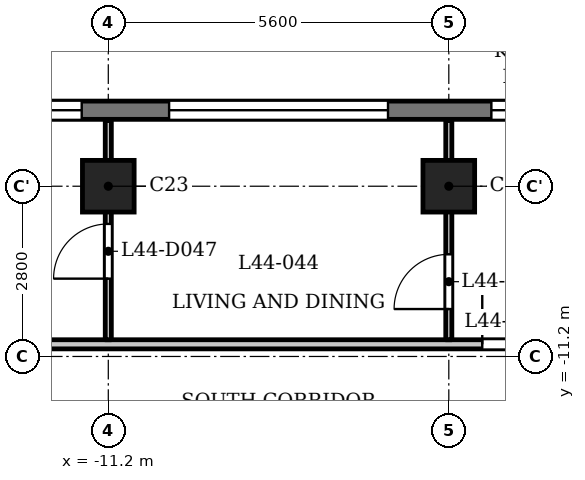
"""IFC4 building model, lengths in metres.
Left out: names, types, materials, properties, quantities, classifications, styles, units other than length and angle.
Written with IfcOpenShell. Run it as: python <this file> out.ifc"""

import sys

from ifc_helpers import new_model, si_unit, direction, frame, frame_2d, origin, origin_2d, place, context, subcontext, project, spatial, rectangle, extrude, element, fill, save


model = new_model("IFC4")
c1 = context("Model", 3, precision=1e-05, world=origin(), true_north=direction((0.0, 1.0)))
c2 = subcontext(c1, "Body", "Model", "MODEL_VIEW")
j1 = project(units=[si_unit("LENGTHUNIT", "METRE"), si_unit("PLANEANGLEUNIT", "RADIAN")], contexts=[c1])
p1 = place(None, origin())
s1 = spatial("IfcSite", under=j1, at=p1, CompositionType="ELEMENT")
p2 = place(p1, origin())
s2 = spatial("IfcBuilding", under=s1, at=p2, CompositionType="ELEMENT")
p3 = place(p2, frame((0.0, 0.0, 171.1)))
s3 = spatial("IfcBuildingStorey", under=s2, at=p3, CompositionType="ELEMENT", Elevation=171.1)
for number, where, z_axis, x_axis in (
    (1, (-11.2, -8.4, 0.0), (0.0, 0.0, 1.0), (1.0, 0.0, 0.0)),
    (2, (-5.6, -8.4, 0.0), (0.0, 0.0, 1.0), (1.0, 0.0, 0.0)),
):
    element("IfcColumn", number, at=place(p3, frame(where, z_axis=z_axis, x_axis=x_axis)), inside=s3, PredefinedType="COLUMN", context=c2, shape_type="SweptSolid", body=[
        extrude(rectangle(XDim=0.85, YDim=0.85, at=origin_2d()), origin(), (0.0, 0.0, 1.0), 3.5),
    ])
p4 = place(p3, frame((13.8, -7.15, 0.0), z_axis=(0.0, 0.0, 1.0), x_axis=(-1.0, 0.0, 0.0)))
e3 = element("IfcWall", 3, at=p4, inside=s3, PredefinedType="SOLIDWALL", context=c2, shape_type="SweptSolid", body=[
    extrude(rectangle(XDim=27.6, YDim=0.3, at=frame_2d((13.8, 0.0))), origin(), (0.0, 0.0, 1.0), 3.2),
])
p5 = place(p4, frame((0.363, 0.0, 0.9)))
e4 = element("IfcOpeningElement", 4, at=p5, cuts=e3, PredefinedType="OPENING", context=c2, shape_type="SweptSolid", body=[
    extrude(rectangle(XDim=1.8, YDim=1.25, at=frame_2d((0.9, 0.625))), frame((0.0, 0.16, 0.0), z_axis=(0.0, -1.0, 0.0), x_axis=(1.0, 0.0, 0.0)), (0.0, 0.0, 1.0), 0.32),
])
p6 = place(p4, frame((3.6, 0.0, 1.2)))
e5 = element("IfcOpeningElement", 5, at=p6, cuts=e3, PredefinedType="OPENING", context=c2, shape_type="SweptSolid", body=[
    extrude(rectangle(XDim=3.6, YDim=0.95, at=frame_2d((1.8, 0.475))), frame((0.0, 0.16, 0.0), z_axis=(0.0, -1.0, 0.0), x_axis=(1.0, 0.0, 0.0)), (0.0, 0.0, 1.0), 0.32),
])
p7 = place(p4, frame((8.9, 0.0, 0.9)))
e6 = element("IfcOpeningElement", 6, at=p7, cuts=e3, PredefinedType="OPENING", context=c2, shape_type="SweptSolid", body=[
    extrude(rectangle(XDim=1.8, YDim=1.25, at=frame_2d((0.9, 0.625))), frame((0.0, 0.16, 0.0), z_axis=(0.0, -1.0, 0.0), x_axis=(1.0, 0.0, 0.0)), (0.0, 0.0, 1.0), 0.32),
])
p8 = place(p4, frame((12.0, 0.0, 0.6)))
e7 = element("IfcOpeningElement", 7, at=p8, cuts=e3, PredefinedType="OPENING", context=c2, shape_type="SweptSolid", body=[
    extrude(rectangle(XDim=1.2, YDim=1.55, at=frame_2d((0.6, 0.775))), frame((0.0, 0.16, 0.0), z_axis=(0.0, -1.0, 0.0), x_axis=(1.0, 0.0, 0.0)), (0.0, 0.0, 1.0), 0.32),
])
p9 = place(p4, frame((14.4, 0.0, 0.6)))
e8 = element("IfcOpeningElement", 8, at=p9, cuts=e3, PredefinedType="OPENING", context=c2, shape_type="SweptSolid", body=[
    extrude(rectangle(XDim=1.2, YDim=1.55, at=frame_2d((0.6, 0.775))), frame((0.0, 0.16, 0.0), z_axis=(0.0, -1.0, 0.0), x_axis=(1.0, 0.0, 0.0)), (0.0, 0.0, 1.0), 0.32),
])
p10 = place(p4, frame((16.9, 0.0, 0.9)))
e9 = element("IfcOpeningElement", 9, at=p10, cuts=e3, PredefinedType="OPENING", context=c2, shape_type="SweptSolid", body=[
    extrude(rectangle(XDim=1.8, YDim=1.25, at=frame_2d((0.9, 0.625))), frame((0.0, 0.16, 0.0), z_axis=(0.0, -1.0, 0.0), x_axis=(1.0, 0.0, 0.0)), (0.0, 0.0, 1.0), 0.32),
])
p11 = place(p4, frame((20.4, 0.0, 1.2)))
e10 = element("IfcOpeningElement", 10, at=p11, cuts=e3, PredefinedType="OPENING", context=c2, shape_type="SweptSolid", body=[
    extrude(rectangle(XDim=3.6, YDim=0.95, at=frame_2d((1.8, 0.475))), frame((0.0, 0.16, 0.0), z_axis=(0.0, -1.0, 0.0), x_axis=(1.0, 0.0, 0.0)), (0.0, 0.0, 1.0), 0.32),
])
p12 = place(p4, frame((25.438, 0.0, 0.9)))
e11 = element("IfcOpeningElement", 11, at=p12, cuts=e3, PredefinedType="OPENING", context=c2, shape_type="SweptSolid", body=[
    extrude(rectangle(XDim=1.8, YDim=1.25, at=frame_2d((0.9, 0.625))), frame((0.0, 0.16, 0.0), z_axis=(0.0, -1.0, 0.0), x_axis=(1.0, 0.0, 0.0)), (0.0, 0.0, 1.0), 0.32),
])
p13 = place(p3, frame((-14.925, -11.0, 0.0), z_axis=(0.0, 0.0, 1.0), x_axis=(1.0, 0.0, 0.0)))
e12 = element("IfcWall", 12, at=p13, inside=s3, PredefinedType="PARTITIONING", context=c2, shape_type="SweptSolid", body=[
    extrude(rectangle(XDim=29.85, YDim=0.15, at=frame_2d((14.925, 0.0))), origin(), (0.0, 0.0, 1.0), 3.2),
])
p14 = place(p13, frame((9.875, 0.0, 0.0)))
e13 = element("IfcOpeningElement", 13, at=p14, cuts=e12, PredefinedType="OPENING", context=c2, shape_type="SweptSolid", body=[
    extrude(rectangle(XDim=1.0, YDim=2.1, at=frame_2d((0.5, 1.05))), frame((0.0, 0.085, 0.0), z_axis=(0.0, -1.0, 0.0), x_axis=(1.0, 0.0, 0.0)), (0.0, 0.0, 1.0), 0.17),
])
p15 = place(p13, frame((17.875, 0.0, 0.0)))
e14 = element("IfcOpeningElement", 14, at=p15, cuts=e12, PredefinedType="OPENING", context=c2, shape_type="SweptSolid", body=[
    extrude(rectangle(XDim=1.0, YDim=2.1, at=frame_2d((0.5, 1.05))), frame((0.0, 0.085, 0.0), z_axis=(0.0, -1.0, 0.0), x_axis=(1.0, 0.0, 0.0)), (0.0, 0.0, 1.0), 0.17),
])
p16 = place(p3, frame((-11.2, -10.925, 0.0), z_axis=(0.0, 0.0, 1.0), x_axis=(0.0, 1.0, 0.0)))
e15 = element("IfcWall", 15, at=p16, inside=s3, PredefinedType="PARTITIONING", context=c2, shape_type="SweptSolid", body=[
    extrude(rectangle(XDim=3.605, YDim=0.1, at=frame_2d((1.802, 0.0))), origin(), (0.0, 0.0, 1.0), 3.2),
])
p17 = place(p16, frame((1.005, 0.0, 0.0)))
e16 = element("IfcOpeningElement", 16, at=p17, cuts=e15, PredefinedType="OPENING", context=c2, shape_type="SweptSolid", body=[
    extrude(rectangle(XDim=0.9, YDim=2.1, at=frame_2d((0.45, 1.05))), frame((0.0, 0.06, 0.0), z_axis=(0.0, -1.0, 0.0), x_axis=(1.0, 0.0, 0.0)), (0.0, 0.0, 1.0), 0.12),
])
p18 = place(p3, frame((-5.6, -10.925, 0.0), z_axis=(0.0, 0.0, 1.0), x_axis=(0.0, 1.0, 0.0)))
e17 = element("IfcWall", 17, at=p18, inside=s3, PredefinedType="PARTITIONING", context=c2, shape_type="SweptSolid", body=[
    extrude(rectangle(XDim=3.605, YDim=0.1, at=frame_2d((1.802, 0.0))), origin(), (0.0, 0.0, 1.0), 3.2),
])
p19 = place(p18, frame((0.505, 0.0, 0.0)))
e18 = element("IfcOpeningElement", 18, at=p19, cuts=e17, PredefinedType="OPENING", context=c2, shape_type="SweptSolid", body=[
    extrude(rectangle(XDim=0.9, YDim=2.1, at=frame_2d((0.45, 1.05))), frame((0.0, 0.06, 0.0), z_axis=(0.0, -1.0, 0.0), x_axis=(1.0, 0.0, 0.0)), (0.0, 0.0, 1.0), 0.12),
])
p20 = place(p14, origin())
e19 = element("IfcDoor", 19, at=p20, inside=s3, OperationType="SINGLE_SWING_RIGHT", PredefinedType="DOOR", context=c2, shape_type="SweptSolid", body=[
    extrude(rectangle(XDim=1.0, YDim=2.1, at=frame_2d((0.5, 1.05))), frame((0.0, 0.025, 0.0), z_axis=(0.0, -1.0, 0.0), x_axis=(1.0, 0.0, 0.0)), (0.0, 0.0, 1.0), 0.05),
])
fill(e13, e19)
p21 = place(p19, origin())
e20 = element("IfcDoor", 20, at=p21, inside=s3, OperationType="SINGLE_SWING_RIGHT", PredefinedType="DOOR", context=c2, shape_type="SweptSolid", body=[
    extrude(rectangle(XDim=0.9, YDim=2.1, at=frame_2d((0.45, 1.05))), frame((0.0, 0.025, 0.0), z_axis=(0.0, -1.0, 0.0), x_axis=(1.0, 0.0, 0.0)), (0.0, 0.0, 1.0), 0.05),
])
fill(e18, e20)
p22 = place(p17, origin())
e21 = element("IfcDoor", 21, at=p22, inside=s3, OperationType="SINGLE_SWING_RIGHT", PredefinedType="DOOR", context=c2, shape_type="SweptSolid", body=[
    extrude(rectangle(XDim=0.9, YDim=2.1, at=frame_2d((0.45, 1.05))), frame((0.0, 0.025, 0.0), z_axis=(0.0, -1.0, 0.0), x_axis=(1.0, 0.0, 0.0)), (0.0, 0.0, 1.0), 0.05),
])
fill(e16, e21)
p23 = place(p10, origin())
e22 = element("IfcWindow", 22, at=p23, inside=s3, PartitioningType="SINGLE_PANEL", PredefinedType="WINDOW", context=c2, shape_type="SweptSolid", body=[
    extrude(rectangle(XDim=1.8, YDim=1.25, at=frame_2d((0.9, 0.625))), frame((0.0, 0.03, 0.0), z_axis=(0.0, -1.0, 0.0), x_axis=(1.0, 0.0, 0.0)), (0.0, 0.0, 1.0), 0.06),
])
fill(e9, e22)
p24 = place(p11, origin())
e23 = element("IfcWindow", 23, at=p24, inside=s3, PartitioningType="SINGLE_PANEL", PredefinedType="WINDOW", context=c2, shape_type="SweptSolid", body=[
    extrude(rectangle(XDim=3.6, YDim=0.95, at=frame_2d((1.8, 0.475))), frame((0.0, 0.03, 0.0), z_axis=(0.0, -1.0, 0.0), x_axis=(1.0, 0.0, 0.0)), (0.0, 0.0, 1.0), 0.06),
])
fill(e10, e23)
p25 = place(p12, origin())
e24 = element("IfcWindow", 24, at=p25, inside=s3, PartitioningType="SINGLE_PANEL", PredefinedType="WINDOW", context=c2, shape_type="SweptSolid", body=[
    extrude(rectangle(XDim=1.8, YDim=1.25, at=frame_2d((0.9, 0.625))), frame((0.0, 0.03, 0.0), z_axis=(0.0, -1.0, 0.0), x_axis=(1.0, 0.0, 0.0)), (0.0, 0.0, 1.0), 0.06),
])
fill(e11, e24)
save(model, sys.argv[1])
